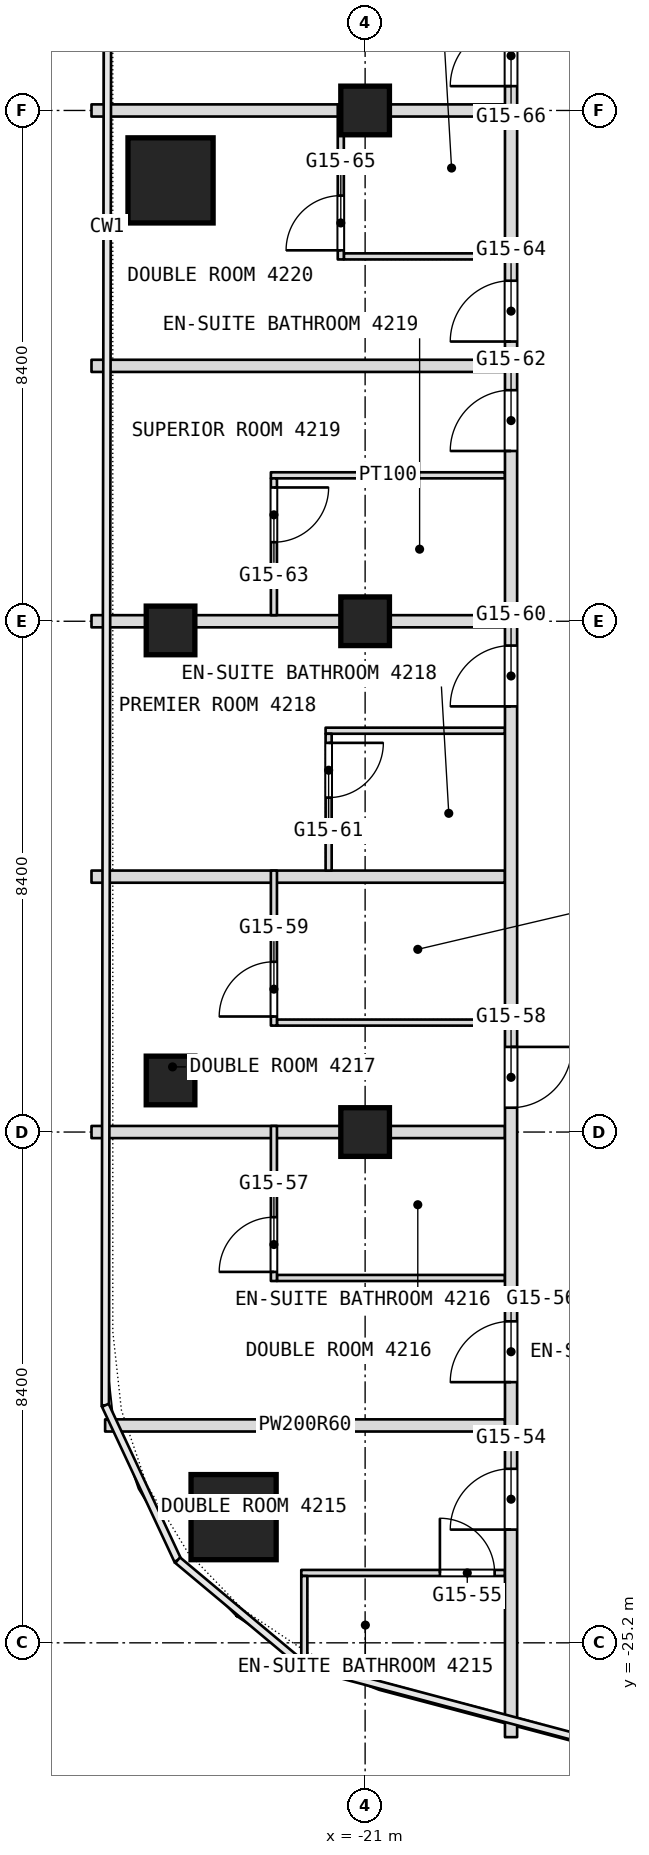
"""IFC4 building model, lengths in metres.
Left out: names, types, materials, properties, quantities, classifications, styles, units other than length and angle.
Written with IfcOpenShell. Run it as: python <this file> out.ifc"""

import sys

from ifc_helpers import new_model, si_unit, direction, frame, frame_2d, origin, origin_2d, place, context, subcontext, project, spatial, rectangle, extrude, element, fill, save


model = new_model("IFC4")
c1 = context("Model", 3, precision=1e-05, world=origin(), true_north=direction((0.0, 1.0)))
c2 = subcontext(c1, "Body", "Model", "MODEL_VIEW")
j1 = project(units=[si_unit("LENGTHUNIT", "METRE"), si_unit("PLANEANGLEUNIT", "RADIAN")], contexts=[c1])
p1 = place(None, origin())
s1 = spatial("IfcSite", under=j1, at=p1, CompositionType="ELEMENT")
p2 = place(p1, origin())
s2 = spatial("IfcBuilding", under=s1, at=p2, CompositionType="ELEMENT")
p3 = place(p2, frame((0.0, 0.0, 187.7)))
s3 = spatial("IfcBuildingStorey", under=s2, at=p3, CompositionType="ELEMENT", Elevation=187.7)
for number, where, z_axis, x_axis in (
    (1, (-23.163, -23.133, 0.0), (0.0, 0.0, 1.0), (1.0, 0.0, 0.0)),
    (2, (-24.2, -1.15, 0.0), (0.0, 0.0, 1.0), (1.0, 0.0, 0.0)),
):
    element("IfcColumn", number, at=place(p3, frame(where, z_axis=z_axis, x_axis=x_axis)), inside=s3, PredefinedType="COLUMN", context=c2, shape_type="SweptSolid", body=[
        extrude(rectangle(XDim=1.4, YDim=1.4, at=origin_2d()), origin(), (0.0, 0.0, 1.0), 3.6),
    ])
for number, where, z_axis, x_axis in (
    (3, (-21.0, -16.8, 0.0), (0.0, 0.0, 1.0), (1.0, 0.0, 0.0)),
    (4, (-21.0, -8.4, 0.0), (0.0, 0.0, 1.0), (1.0, 0.0, 0.0)),
    (5, (-21.0, 0.0, 0.0), (0.0, 0.0, 1.0), (1.0, 0.0, 0.0)),
    (6, (-24.2, -15.952, 0.0), (0.0, 0.0, 1.0), (1.0, 0.0, 0.0)),
    (7, (-24.2, -8.551, 0.0), (0.0, 0.0, 1.0), (1.0, 0.0, 0.0)),
):
    element("IfcColumn", number, at=place(p3, frame(where, z_axis=z_axis, x_axis=x_axis)), inside=s3, PredefinedType="COLUMN", context=c2, shape_type="SweptSolid", body=[
        extrude(rectangle(XDim=0.8, YDim=0.8, at=origin_2d()), origin(), (0.0, 0.0, 1.0), 3.6),
    ])
p4 = place(p3, frame((-22.05, -24.051, 0.0), z_axis=(0.0, 0.0, 1.0), x_axis=(1.0, 0.0, 0.0)))
e8 = element("IfcWall", 8, at=p4, inside=s3, PredefinedType="PARTITIONING", context=c2, shape_type="SweptSolid", body=[
    extrude(rectangle(XDim=3.35, YDim=0.1, at=frame_2d((1.675, 0.0))), origin(), (0.0, 0.0, 1.0), 3.34),
])
p5 = place(p4, frame((2.28, 0.0, 0.0)))
e9 = element("IfcOpeningElement", 9, at=p5, cuts=e8, PredefinedType="OPENING", context=c2, shape_type="SweptSolid", body=[
    extrude(rectangle(XDim=0.9, YDim=2.1, at=frame_2d((0.45, 1.05))), frame((0.0, 0.05, 0.0), z_axis=(0.0, -1.0, 0.0), x_axis=(1.0, 0.0, 0.0)), (0.0, 0.0, 1.0), 0.1),
])
p6 = place(p3, frame((-25.276, -21.625, 0.0), z_axis=(0.0, 0.0, 1.0), x_axis=(1.0, 0.0, 0.0)))
e10 = element("IfcWall", 10, at=p6, inside=s3, PredefinedType="PARTITIONING", context=c2, shape_type="SweptSolid", body=[
    extrude(rectangle(XDim=6.576, YDim=0.2, at=frame_2d((3.288, 0.0))), origin(), (0.0, 0.0, 1.0), 3.34),
])
p7 = place(p3, frame((-22.45, -19.2, 0.0), z_axis=(0.0, 0.0, 1.0), x_axis=(1.0, 0.0, 0.0)))
e11 = element("IfcWall", 11, at=p7, inside=s3, PredefinedType="PARTITIONING", context=c2, shape_type="SweptSolid", body=[
    extrude(rectangle(XDim=3.75, YDim=0.1, at=frame_2d((1.875, 0.0))), origin(), (0.0, 0.0, 1.0), 3.34),
])
p8 = place(p3, frame((-25.5, -16.8, 0.0), z_axis=(0.0, 0.0, 1.0), x_axis=(1.0, 0.0, 0.0)))
e12 = element("IfcWall", 12, at=p8, inside=s3, PredefinedType="PARTITIONING", context=c2, shape_type="SweptSolid", body=[
    extrude(rectangle(XDim=6.8, YDim=0.2, at=frame_2d((3.4, 0.0))), origin(), (0.0, 0.0, 1.0), 2.94),
])
p9 = place(p3, frame((-22.45, -15.0, 0.0), z_axis=(0.0, 0.0, 1.0), x_axis=(1.0, 0.0, 0.0)))
e13 = element("IfcWall", 13, at=p9, inside=s3, PredefinedType="PARTITIONING", context=c2, shape_type="SweptSolid", body=[
    extrude(rectangle(XDim=3.75, YDim=0.1, at=frame_2d((1.875, 0.0))), origin(), (0.0, 0.0, 1.0), 3.34),
])
p10 = place(p3, frame((-25.5, -12.6, 0.0), z_axis=(0.0, 0.0, 1.0), x_axis=(1.0, 0.0, 0.0)))
e14 = element("IfcWall", 14, at=p10, inside=s3, PredefinedType="PARTITIONING", context=c2, shape_type="SweptSolid", body=[
    extrude(rectangle(XDim=6.8, YDim=0.2, at=frame_2d((3.4, 0.0))), origin(), (0.0, 0.0, 1.0), 3.34),
])
p11 = place(p3, frame((-21.65, -10.2, 0.0), z_axis=(0.0, 0.0, 1.0), x_axis=(1.0, 0.0, 0.0)))
e15 = element("IfcWall", 15, at=p11, inside=s3, PredefinedType="PARTITIONING", context=c2, shape_type="SweptSolid", body=[
    extrude(rectangle(XDim=2.95, YDim=0.1, at=frame_2d((1.475, 0.0))), origin(), (0.0, 0.0, 1.0), 3.34),
])
p12 = place(p3, frame((-25.5, -8.4, 0.0), z_axis=(0.0, 0.0, 1.0), x_axis=(1.0, 0.0, 0.0)))
e16 = element("IfcWall", 16, at=p12, inside=s3, PredefinedType="PARTITIONING", context=c2, shape_type="SweptSolid", body=[
    extrude(rectangle(XDim=6.8, YDim=0.2, at=frame_2d((3.4, 0.0))), origin(), (0.0, 0.0, 1.0), 2.94),
])
p13 = place(p3, frame((-22.55, -6.0, 0.0), z_axis=(0.0, 0.0, 1.0), x_axis=(1.0, 0.0, 0.0)))
e17 = element("IfcWall", 17, at=p13, inside=s3, PredefinedType="PARTITIONING", context=c2, shape_type="SweptSolid", body=[
    extrude(rectangle(XDim=3.85, YDim=0.1, at=frame_2d((1.925, 0.0))), origin(), (0.0, 0.0, 1.0), 3.34),
])
p14 = place(p3, frame((-25.5, -4.2, 0.0), z_axis=(0.0, 0.0, 1.0), x_axis=(1.0, 0.0, 0.0)))
e18 = element("IfcWall", 18, at=p14, inside=s3, PredefinedType="PARTITIONING", context=c2, shape_type="SweptSolid", body=[
    extrude(rectangle(XDim=6.8, YDim=0.2, at=frame_2d((3.4, 0.0))), origin(), (0.0, 0.0, 1.0), 3.34),
])
p15 = place(p3, frame((-21.35, -2.4, 0.0), z_axis=(0.0, 0.0, 1.0), x_axis=(1.0, 0.0, 0.0)))
e19 = element("IfcWall", 19, at=p15, inside=s3, PredefinedType="PARTITIONING", context=c2, shape_type="SweptSolid", body=[
    extrude(rectangle(XDim=2.65, YDim=0.1, at=frame_2d((1.325, 0.0))), origin(), (0.0, 0.0, 1.0), 3.34),
])
p16 = place(p3, frame((-25.5, 0.0, 0.0), z_axis=(0.0, 0.0, 1.0), x_axis=(1.0, 0.0, 0.0)))
e20 = element("IfcWall", 20, at=p16, inside=s3, PredefinedType="PARTITIONING", context=c2, shape_type="SweptSolid", body=[
    extrude(rectangle(XDim=6.8, YDim=0.2, at=frame_2d((3.4, 0.0))), origin(), (0.0, 0.0, 1.0), 2.94),
])
p17 = place(p3, frame((-18.6, -26.751, 0.0), z_axis=(0.0, 0.0, 1.0), x_axis=(0.0, 1.0, 0.0)))
e21 = element("IfcWall", 21, at=p17, inside=s3, PredefinedType="PARTITIONING", context=c2, shape_type="SweptSolid", body=[
    extrude(rectangle(XDim=49.091, YDim=0.2, at=frame_2d((24.545, 0.0))), origin(), (0.0, 0.0, 1.0), 3.34),
])
p18 = place(p17, frame((3.413, 0.0, 0.0)))
e22 = element("IfcOpeningElement", 22, at=p18, cuts=e21, PredefinedType="OPENING", context=c2, shape_type="SweptSolid", body=[
    extrude(rectangle(XDim=1.0, YDim=2.1, at=frame_2d((0.5, 1.05))), frame((0.0, 0.1, 0.0), z_axis=(0.0, -1.0, 0.0), x_axis=(1.0, 0.0, 0.0)), (0.0, 0.0, 1.0), 0.2),
])
p19 = place(p17, frame((5.838, 0.0, 0.0)))
e23 = element("IfcOpeningElement", 23, at=p19, cuts=e21, PredefinedType="OPENING", context=c2, shape_type="SweptSolid", body=[
    extrude(rectangle(XDim=1.0, YDim=2.1, at=frame_2d((0.5, 1.05))), frame((0.0, 0.1, 0.0), z_axis=(0.0, -1.0, 0.0), x_axis=(1.0, 0.0, 0.0)), (0.0, 0.0, 1.0), 0.2),
])
p20 = place(p17, frame((10.351, 0.0, 0.0)))
e24 = element("IfcOpeningElement", 24, at=p20, cuts=e21, PredefinedType="OPENING", context=c2, shape_type="SweptSolid", body=[
    extrude(rectangle(XDim=1.0, YDim=2.1, at=frame_2d((0.5, 1.05))), frame((0.0, 0.1, 0.0), z_axis=(0.0, -1.0, 0.0), x_axis=(1.0, 0.0, 0.0)), (0.0, 0.0, 1.0), 0.2),
])
p21 = place(p17, frame((16.951, 0.0, 0.0)))
e25 = element("IfcOpeningElement", 25, at=p21, cuts=e21, PredefinedType="OPENING", context=c2, shape_type="SweptSolid", body=[
    extrude(rectangle(XDim=1.0, YDim=2.1, at=frame_2d((0.5, 1.05))), frame((0.0, 0.1, 0.0), z_axis=(0.0, -1.0, 0.0), x_axis=(1.0, 0.0, 0.0)), (0.0, 0.0, 1.0), 0.2),
])
p22 = place(p17, frame((21.151, 0.0, 0.0)))
e26 = element("IfcOpeningElement", 26, at=p22, cuts=e21, PredefinedType="OPENING", context=c2, shape_type="SweptSolid", body=[
    extrude(rectangle(XDim=1.0, YDim=2.1, at=frame_2d((0.5, 1.05))), frame((0.0, 0.1, 0.0), z_axis=(0.0, -1.0, 0.0), x_axis=(1.0, 0.0, 0.0)), (0.0, 0.0, 1.0), 0.2),
])
p23 = place(p17, frame((22.951, 0.0, 0.0)))
e27 = element("IfcOpeningElement", 27, at=p23, cuts=e21, PredefinedType="OPENING", context=c2, shape_type="SweptSolid", body=[
    extrude(rectangle(XDim=1.0, YDim=2.1, at=frame_2d((0.5, 1.05))), frame((0.0, 0.1, 0.0), z_axis=(0.0, -1.0, 0.0), x_axis=(1.0, 0.0, 0.0)), (0.0, 0.0, 1.0), 0.2),
])
p24 = place(p17, frame((27.151, 0.0, 0.0)))
e28 = element("IfcOpeningElement", 28, at=p24, cuts=e21, PredefinedType="OPENING", context=c2, shape_type="SweptSolid", body=[
    extrude(rectangle(XDim=1.0, YDim=2.1, at=frame_2d((0.5, 1.05))), frame((0.0, 0.1, 0.0), z_axis=(0.0, -1.0, 0.0), x_axis=(1.0, 0.0, 0.0)), (0.0, 0.0, 1.0), 0.2),
])
p25 = place(p17, frame((33.751, 0.0, 0.0)))
e29 = element("IfcOpeningElement", 29, at=p25, cuts=e21, PredefinedType="OPENING", context=c2, shape_type="SweptSolid", body=[
    extrude(rectangle(XDim=1.0, YDim=2.1, at=frame_2d((0.5, 1.05))), frame((0.0, 0.1, 0.0), z_axis=(0.0, -1.0, 0.0), x_axis=(1.0, 0.0, 0.0)), (0.0, 0.0, 1.0), 0.2),
])
p26 = place(p17, frame((37.951, 0.0, 0.0)))
e30 = element("IfcOpeningElement", 30, at=p26, cuts=e21, PredefinedType="OPENING", context=c2, shape_type="SweptSolid", body=[
    extrude(rectangle(XDim=1.0, YDim=2.1, at=frame_2d((0.5, 1.05))), frame((0.0, 0.1, 0.0), z_axis=(0.0, -1.0, 0.0), x_axis=(1.0, 0.0, 0.0)), (0.0, 0.0, 1.0), 0.2),
])
p27 = place(p17, frame((39.751, 0.0, 0.0)))
e31 = element("IfcOpeningElement", 31, at=p27, cuts=e21, PredefinedType="OPENING", context=c2, shape_type="SweptSolid", body=[
    extrude(rectangle(XDim=1.0, YDim=2.1, at=frame_2d((0.5, 1.05))), frame((0.0, 0.1, 0.0), z_axis=(0.0, -1.0, 0.0), x_axis=(1.0, 0.0, 0.0)), (0.0, 0.0, 1.0), 0.2),
])
p28 = place(p17, frame((44.051, 0.0, 0.0)))
e32 = element("IfcOpeningElement", 32, at=p28, cuts=e21, PredefinedType="OPENING", context=c2, shape_type="SweptSolid", body=[
    extrude(rectangle(XDim=1.0, YDim=2.1, at=frame_2d((0.5, 1.05))), frame((0.0, 0.1, 0.0), z_axis=(0.0, -1.0, 0.0), x_axis=(1.0, 0.0, 0.0)), (0.0, 0.0, 1.0), 0.2),
])
p29 = place(p3, frame((-21.4, -2.45, 0.0), z_axis=(0.0, 0.0, 1.0), x_axis=(0.0, 1.0, 0.0)))
e33 = element("IfcWall", 33, at=p29, inside=s3, PredefinedType="PARTITIONING", context=c2, shape_type="SweptSolid", body=[
    extrude(rectangle(XDim=2.55, YDim=0.1, at=frame_2d((1.275, 0.0))), origin(), (0.0, 0.0, 1.0), 3.34),
])
p30 = place(p29, frame((0.15, 0.0, 0.0)))
e34 = element("IfcOpeningElement", 34, at=p30, cuts=e33, PredefinedType="OPENING", context=c2, shape_type="SweptSolid", body=[
    extrude(rectangle(XDim=0.9, YDim=2.1, at=frame_2d((0.45, 1.05))), frame((0.0, 0.05, 0.0), z_axis=(0.0, -1.0, 0.0), x_axis=(1.0, 0.0, 0.0)), (0.0, 0.0, 1.0), 0.1),
])
p31 = place(p3, frame((-21.6, -12.5, 0.0), z_axis=(0.0, 0.0, 1.0), x_axis=(0.0, 1.0, 0.0)))
e35 = element("IfcWall", 35, at=p31, inside=s3, PredefinedType="PARTITIONING", context=c2, shape_type="SweptSolid", body=[
    extrude(rectangle(XDim=2.25, YDim=0.1, at=frame_2d((1.125, 0.0))), origin(), (0.0, 0.0, 1.0), 3.34),
])
p32 = place(p31, frame((1.2, 0.0, 0.0)))
e36 = element("IfcOpeningElement", 36, at=p32, cuts=e35, PredefinedType="OPENING", context=c2, shape_type="SweptSolid", body=[
    extrude(rectangle(XDim=0.9, YDim=2.1, at=frame_2d((0.45, 1.05))), frame((0.0, 0.05, 0.0), z_axis=(0.0, -1.0, 0.0), x_axis=(1.0, 0.0, 0.0)), (0.0, 0.0, 1.0), 0.1),
])
p33 = place(p3, frame((-22.0, -25.685, 0.0), z_axis=(0.0, 0.0, 1.0), x_axis=(0.0, 1.0, 0.0)))
e37 = element("IfcWall", 37, at=p33, inside=s3, PredefinedType="PARTITIONING", context=c2, shape_type="SweptSolid", body=[
    extrude(rectangle(XDim=1.584, YDim=0.1, at=frame_2d((0.792, 0.0))), origin(), (0.0, 0.0, 1.0), 3.34),
])
p34 = place(p3, frame((-22.5, -19.25, 0.0), z_axis=(0.0, 0.0, 1.0), x_axis=(0.0, 1.0, 0.0)))
e38 = element("IfcWall", 38, at=p34, inside=s3, PredefinedType="PARTITIONING", context=c2, shape_type="SweptSolid", body=[
    extrude(rectangle(XDim=2.55, YDim=0.1, at=frame_2d((1.275, 0.0))), origin(), (0.0, 0.0, 1.0), 3.34),
])
p35 = place(p34, frame((0.15, 0.0, 0.0)))
e39 = element("IfcOpeningElement", 39, at=p35, cuts=e38, PredefinedType="OPENING", context=c2, shape_type="SweptSolid", body=[
    extrude(rectangle(XDim=0.9, YDim=2.1, at=frame_2d((0.45, 1.05))), frame((0.0, 0.05, 0.0), z_axis=(0.0, -1.0, 0.0), x_axis=(1.0, 0.0, 0.0)), (0.0, 0.0, 1.0), 0.1),
])
p36 = place(p3, frame((-22.5, -15.05, 0.0), z_axis=(0.0, 0.0, 1.0), x_axis=(0.0, 1.0, 0.0)))
e40 = element("IfcWall", 40, at=p36, inside=s3, PredefinedType="PARTITIONING", context=c2, shape_type="SweptSolid", body=[
    extrude(rectangle(XDim=2.55, YDim=0.1, at=frame_2d((1.275, 0.0))), origin(), (0.0, 0.0, 1.0), 3.34),
])
p37 = place(p36, frame((0.15, 0.0, 0.0)))
e41 = element("IfcOpeningElement", 41, at=p37, cuts=e40, PredefinedType="OPENING", context=c2, shape_type="SweptSolid", body=[
    extrude(rectangle(XDim=0.9, YDim=2.1, at=frame_2d((0.45, 1.05))), frame((0.0, 0.05, 0.0), z_axis=(0.0, -1.0, 0.0), x_axis=(1.0, 0.0, 0.0)), (0.0, 0.0, 1.0), 0.1),
])
p38 = place(p3, frame((-22.5, -8.3, 0.0), z_axis=(0.0, 0.0, 1.0), x_axis=(0.0, 1.0, 0.0)))
e42 = element("IfcWall", 42, at=p38, inside=s3, PredefinedType="PARTITIONING", context=c2, shape_type="SweptSolid", body=[
    extrude(rectangle(XDim=2.25, YDim=0.1, at=frame_2d((1.125, 0.0))), origin(), (0.0, 0.0, 1.0), 3.34),
])
p39 = place(p38, frame((1.2, 0.0, 0.0)))
e43 = element("IfcOpeningElement", 43, at=p39, cuts=e42, PredefinedType="OPENING", context=c2, shape_type="SweptSolid", body=[
    extrude(rectangle(XDim=0.9, YDim=2.1, at=frame_2d((0.45, 1.05))), frame((0.0, 0.05, 0.0), z_axis=(0.0, -1.0, 0.0), x_axis=(1.0, 0.0, 0.0)), (0.0, 0.0, 1.0), 0.1),
])
p40 = place(p5, origin())
e44 = element("IfcDoor", 44, at=p40, inside=s3, OperationType="SINGLE_SWING_LEFT", PredefinedType="DOOR", context=c2, shape_type="SweptSolid", body=[
    extrude(rectangle(XDim=0.9, YDim=2.1, at=frame_2d((0.45, 1.05))), frame((0.0, 0.025, 0.0), z_axis=(0.0, -1.0, 0.0), x_axis=(1.0, 0.0, 0.0)), (0.0, 0.0, 1.0), 0.05),
])
fill(e9, e44)
p41 = place(p18, origin())
e45 = element("IfcDoor", 45, at=p41, inside=s3, OperationType="SINGLE_SWING_LEFT", PredefinedType="DOOR", context=c2, shape_type="SweptSolid", body=[
    extrude(rectangle(XDim=1.0, YDim=2.1, at=frame_2d((0.5, 1.05))), frame((0.0, 0.025, 0.0), z_axis=(0.0, -1.0, 0.0), x_axis=(1.0, 0.0, 0.0)), (0.0, 0.0, 1.0), 0.05),
])
fill(e22, e45)
p42 = place(p19, origin())
e46 = element("IfcDoor", 46, at=p42, inside=s3, OperationType="SINGLE_SWING_LEFT", PredefinedType="DOOR", context=c2, shape_type="SweptSolid", body=[
    extrude(rectangle(XDim=1.0, YDim=2.1, at=frame_2d((0.5, 1.05))), frame((0.0, 0.025, 0.0), z_axis=(0.0, -1.0, 0.0), x_axis=(1.0, 0.0, 0.0)), (0.0, 0.0, 1.0), 0.05),
])
fill(e23, e46)
p43 = place(p20, origin())
e47 = element("IfcDoor", 47, at=p43, inside=s3, OperationType="SINGLE_SWING_LEFT", PredefinedType="DOOR", context=c2, shape_type="SweptSolid", body=[
    extrude(rectangle(XDim=1.0, YDim=2.1, at=frame_2d((0.5, 1.05))), frame((0.0, 0.025, 0.0), z_axis=(0.0, -1.0, 0.0), x_axis=(1.0, 0.0, 0.0)), (0.0, 0.0, 1.0), 0.05),
])
fill(e24, e47)
p44 = place(p21, origin())
e48 = element("IfcDoor", 48, at=p44, inside=s3, OperationType="SINGLE_SWING_LEFT", PredefinedType="DOOR", context=c2, shape_type="SweptSolid", body=[
    extrude(rectangle(XDim=1.0, YDim=2.1, at=frame_2d((0.5, 1.05))), frame((0.0, 0.025, 0.0), z_axis=(0.0, -1.0, 0.0), x_axis=(1.0, 0.0, 0.0)), (0.0, 0.0, 1.0), 0.05),
])
fill(e25, e48)
p45 = place(p22, origin())
e49 = element("IfcDoor", 49, at=p45, inside=s3, OperationType="SINGLE_SWING_LEFT", PredefinedType="DOOR", context=c2, shape_type="SweptSolid", body=[
    extrude(rectangle(XDim=1.0, YDim=2.1, at=frame_2d((0.5, 1.05))), frame((0.0, 0.025, 0.0), z_axis=(0.0, -1.0, 0.0), x_axis=(1.0, 0.0, 0.0)), (0.0, 0.0, 1.0), 0.05),
])
fill(e26, e49)
p46 = place(p23, origin())
e50 = element("IfcDoor", 50, at=p46, inside=s3, OperationType="SINGLE_SWING_LEFT", PredefinedType="DOOR", context=c2, shape_type="SweptSolid", body=[
    extrude(rectangle(XDim=1.0, YDim=2.1, at=frame_2d((0.5, 1.05))), frame((0.0, 0.025, 0.0), z_axis=(0.0, -1.0, 0.0), x_axis=(1.0, 0.0, 0.0)), (0.0, 0.0, 1.0), 0.05),
])
fill(e27, e50)
p47 = place(p24, origin())
e51 = element("IfcDoor", 51, at=p47, inside=s3, OperationType="SINGLE_SWING_LEFT", PredefinedType="DOOR", context=c2, shape_type="SweptSolid", body=[
    extrude(rectangle(XDim=1.0, YDim=2.1, at=frame_2d((0.5, 1.05))), frame((0.0, 0.025, 0.0), z_axis=(0.0, -1.0, 0.0), x_axis=(1.0, 0.0, 0.0)), (0.0, 0.0, 1.0), 0.05),
])
fill(e28, e51)
p48 = place(p30, origin())
e52 = element("IfcDoor", 52, at=p48, inside=s3, OperationType="SINGLE_SWING_RIGHT", PredefinedType="DOOR", context=c2, shape_type="SweptSolid", body=[
    extrude(rectangle(XDim=0.9, YDim=2.1, at=frame_2d((0.45, 1.05))), frame((0.0, 0.025, 0.0), z_axis=(0.0, -1.0, 0.0), x_axis=(1.0, 0.0, 0.0)), (0.0, 0.0, 1.0), 0.05),
])
fill(e34, e52)
p49 = place(p32, origin())
e53 = element("IfcDoor", 53, at=p49, inside=s3, OperationType="SINGLE_SWING_LEFT", PredefinedType="DOOR", context=c2, shape_type="SweptSolid", body=[
    extrude(rectangle(XDim=0.9, YDim=2.1, at=frame_2d((0.45, 1.05))), frame((0.0, 0.025, 0.0), z_axis=(0.0, -1.0, 0.0), x_axis=(1.0, 0.0, 0.0)), (0.0, 0.0, 1.0), 0.05),
])
fill(e36, e53)
p50 = place(p35, origin())
e54 = element("IfcDoor", 54, at=p50, inside=s3, OperationType="SINGLE_SWING_RIGHT", PredefinedType="DOOR", context=c2, shape_type="SweptSolid", body=[
    extrude(rectangle(XDim=0.9, YDim=2.1, at=frame_2d((0.45, 1.05))), frame((0.0, 0.025, 0.0), z_axis=(0.0, -1.0, 0.0), x_axis=(1.0, 0.0, 0.0)), (0.0, 0.0, 1.0), 0.05),
])
fill(e39, e54)
p51 = place(p37, origin())
e55 = element("IfcDoor", 55, at=p51, inside=s3, OperationType="SINGLE_SWING_RIGHT", PredefinedType="DOOR", context=c2, shape_type="SweptSolid", body=[
    extrude(rectangle(XDim=0.9, YDim=2.1, at=frame_2d((0.45, 1.05))), frame((0.0, 0.025, 0.0), z_axis=(0.0, -1.0, 0.0), x_axis=(1.0, 0.0, 0.0)), (0.0, 0.0, 1.0), 0.05),
])
fill(e41, e55)
p52 = place(p39, origin())
e56 = element("IfcDoor", 56, at=p52, inside=s3, OperationType="SINGLE_SWING_LEFT", PredefinedType="DOOR", context=c2, shape_type="SweptSolid", body=[
    extrude(rectangle(XDim=0.9, YDim=2.1, at=frame_2d((0.45, 1.05))), frame((0.0, 0.025, 0.0), z_axis=(0.0, -1.0, 0.0), x_axis=(1.0, 0.0, 0.0)), (0.0, 0.0, 1.0), 0.05),
])
fill(e43, e56)
save(model, sys.argv[1])
